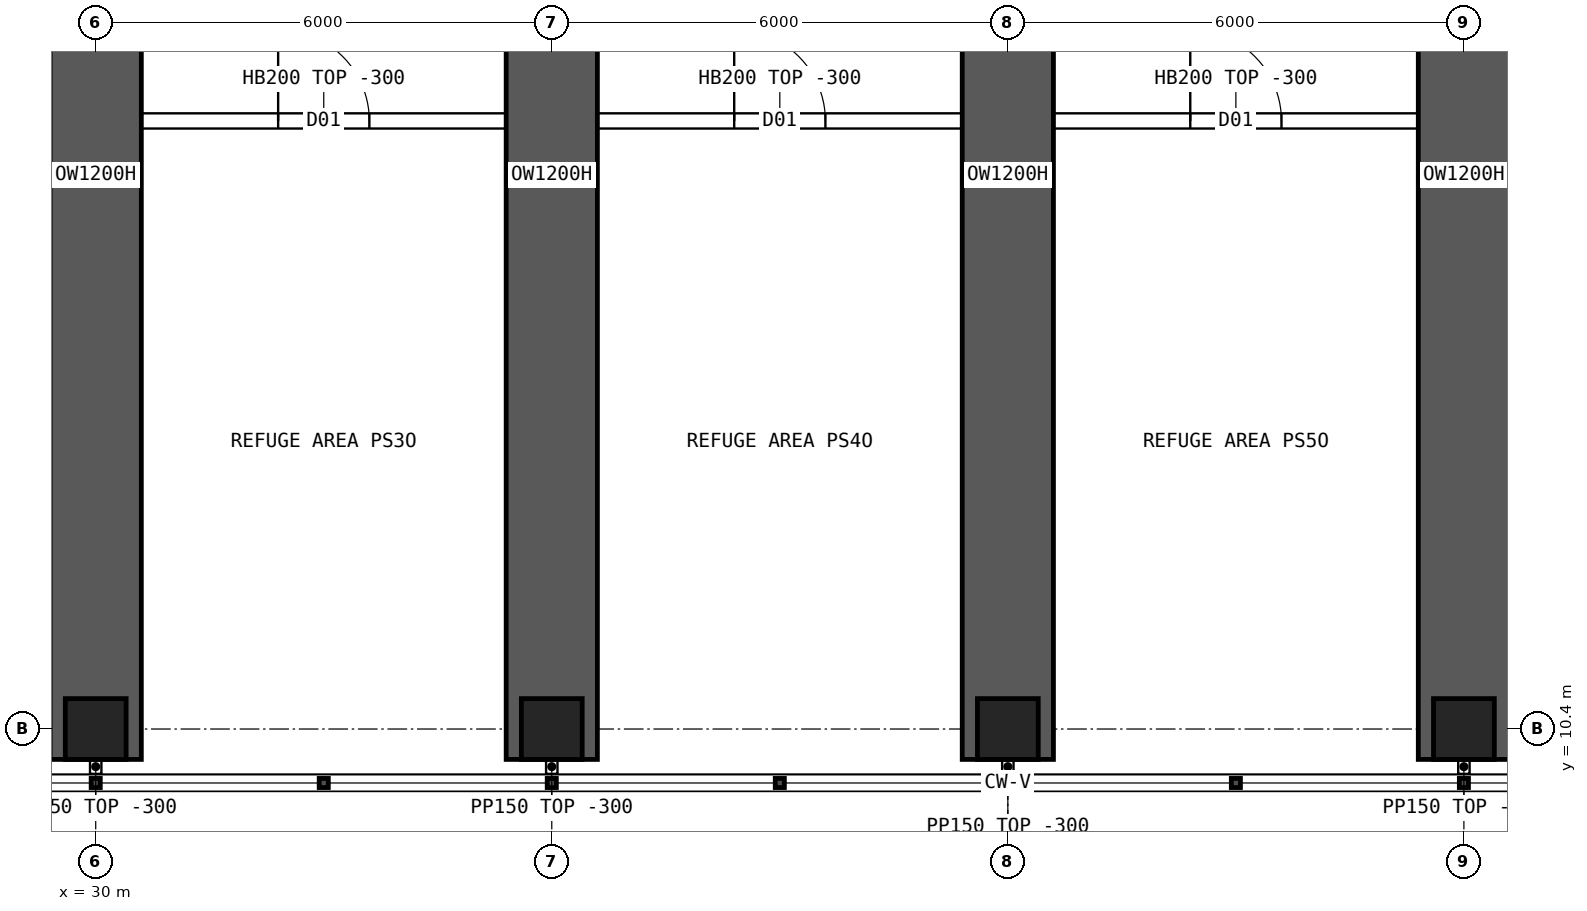
"""IFC4 building model, lengths in metres.
Left out: names, types, materials, properties, quantities, classifications, styles, units other than length and angle.
Written with IfcOpenShell. Run it as: python <this file> out.ifc"""

import sys

from ifc_helpers import new_model, si_unit, direction, frame, frame_2d, origin, origin_2d, place, context, subcontext, project, spatial, rectangle, hollow_rectangle, extrude, element, fill, save


model = new_model("IFC4")
c1 = context("Model", 3, precision=1e-05, world=origin(), true_north=direction((0.0, 1.0)))
c2 = subcontext(c1, "Body", "Model", "MODEL_VIEW")
j1 = project(units=[si_unit("LENGTHUNIT", "METRE"), si_unit("PLANEANGLEUNIT", "RADIAN")], contexts=[c1])
p1 = place(None, origin())
s1 = spatial("IfcSite", under=j1, at=p1, CompositionType="ELEMENT")
p2 = place(p1, origin())
s2 = spatial("IfcBuilding", under=s1, at=p2, CompositionType="ELEMENT")
p3 = place(p2, frame((0.0, 0.0, 201.1)))
s3 = spatial("IfcBuildingStorey", under=s2, at=p3, CompositionType="ELEMENT", Elevation=201.1)
for number, where, z_axis, x_axis in (
    (1, (30.0, 10.4, 0.0), (0.0, 0.0, 1.0), (1.0, 0.0, 0.0)),
    (2, (36.0, 10.4, 0.0), (0.0, 0.0, 1.0), (1.0, 0.0, 0.0)),
    (3, (42.0, 10.4, 0.0), (0.0, 0.0, 1.0), (1.0, 0.0, 0.0)),
    (4, (48.0, 10.4, 0.0), (0.0, 0.0, 1.0), (1.0, 0.0, 0.0)),
):
    element("IfcColumn", number, at=place(p3, frame(where, z_axis=z_axis, x_axis=x_axis)), inside=s3, PredefinedType="COLUMN", context=c2, shape_type="SweptSolid", body=[
        extrude(hollow_rectangle(XDim=0.8, YDim=0.8, WallThickness=0.08, at=origin_2d()), origin(), (0.0, 0.0, 1.0), 7.2),
    ])
p4 = place(p3, frame((30.0, 10.0, 0.0), z_axis=(0.0, 0.0, 1.0), x_axis=(0.0, 1.0, 0.0)))
e5 = element("IfcWall", 5, at=p4, inside=s3, PredefinedType="SHEAR", context=c2, shape_type="SweptSolid", body=[
    extrude(rectangle(XDim=15.375, YDim=1.2, at=frame_2d((7.688, 0.0))), origin(), (0.0, 0.0, 1.0), 7.2),
])
p5 = place(p4, frame((13.775, 0.0, 0.0)))
e6 = element("IfcOpeningElement", 6, at=p5, cuts=e5, PredefinedType="OPENING", context=c2, shape_type="SweptSolid", body=[
    extrude(rectangle(XDim=1.2, YDim=2.1, at=frame_2d((0.6, 1.05))), frame((0.0, 0.61, 0.0), z_axis=(0.0, -1.0, 0.0), x_axis=(1.0, 0.0, 0.0)), (0.0, 0.0, 1.0), 1.22),
])
p6 = place(p3, frame((36.0, 10.0, 0.0), z_axis=(0.0, 0.0, 1.0), x_axis=(0.0, 1.0, 0.0)))
e7 = element("IfcWall", 7, at=p6, inside=s3, PredefinedType="SHEAR", context=c2, shape_type="SweptSolid", body=[
    extrude(rectangle(XDim=15.375, YDim=1.2, at=frame_2d((7.688, 0.0))), origin(), (0.0, 0.0, 1.0), 7.2),
])
p7 = place(p6, frame((13.775, 0.0, 0.0)))
e8 = element("IfcOpeningElement", 8, at=p7, cuts=e7, PredefinedType="OPENING", context=c2, shape_type="SweptSolid", body=[
    extrude(rectangle(XDim=1.2, YDim=2.1, at=frame_2d((0.6, 1.05))), frame((0.0, 0.61, 0.0), z_axis=(0.0, -1.0, 0.0), x_axis=(1.0, 0.0, 0.0)), (0.0, 0.0, 1.0), 1.22),
])
p8 = place(p3, frame((42.0, 10.0, 0.0), z_axis=(0.0, 0.0, 1.0), x_axis=(0.0, 1.0, 0.0)))
e9 = element("IfcWall", 9, at=p8, inside=s3, PredefinedType="SHEAR", context=c2, shape_type="SweptSolid", body=[
    extrude(rectangle(XDim=15.375, YDim=1.2, at=frame_2d((7.688, 0.0))), origin(), (0.0, 0.0, 1.0), 7.2),
])
p9 = place(p8, frame((13.775, 0.0, 0.0)))
e10 = element("IfcOpeningElement", 10, at=p9, cuts=e9, PredefinedType="OPENING", context=c2, shape_type="SweptSolid", body=[
    extrude(rectangle(XDim=1.2, YDim=2.1, at=frame_2d((0.6, 1.05))), frame((0.0, 0.61, 0.0), z_axis=(0.0, -1.0, 0.0), x_axis=(1.0, 0.0, 0.0)), (0.0, 0.0, 1.0), 1.22),
])
p10 = place(p3, frame((48.0, 10.0, 0.0), z_axis=(0.0, 0.0, 1.0), x_axis=(0.0, 1.0, 0.0)))
e11 = element("IfcWall", 11, at=p10, inside=s3, PredefinedType="SHEAR", context=c2, shape_type="SweptSolid", body=[
    extrude(rectangle(XDim=15.375, YDim=1.2, at=frame_2d((7.688, 0.0))), origin(), (0.0, 0.0, 1.0), 7.2),
])
p11 = place(p10, frame((13.775, 0.0, 0.0)))
e12 = element("IfcOpeningElement", 12, at=p11, cuts=e11, PredefinedType="OPENING", context=c2, shape_type="SweptSolid", body=[
    extrude(rectangle(XDim=1.2, YDim=2.1, at=frame_2d((0.6, 1.05))), frame((0.0, 0.61, 0.0), z_axis=(0.0, -1.0, 0.0), x_axis=(1.0, 0.0, 0.0)), (0.0, 0.0, 1.0), 1.22),
])
p12 = place(p3, frame((24.425, 18.4, 0.0), z_axis=(0.0, 0.0, 1.0), x_axis=(1.0, 0.0, 0.0)))
e13 = element("IfcWall", 13, at=p12, inside=s3, PredefinedType="SOLIDWALL", context=c2, shape_type="SweptSolid", body=[
    extrude(rectangle(XDim=5.15, YDim=0.2, at=frame_2d((2.575, 0.0))), origin(), (0.0, 0.0, 1.0), 6.9),
])
p13 = place(p12, frame((1.975, 0.0, 0.0)))
e14 = element("IfcOpeningElement", 14, at=p13, cuts=e13, PredefinedType="OPENING", context=c2, shape_type="SweptSolid", body=[
    extrude(rectangle(XDim=1.2, YDim=2.1, at=frame_2d((0.6, 1.05))), frame((0.0, 0.11, 0.0), z_axis=(0.0, -1.0, 0.0), x_axis=(1.0, 0.0, 0.0)), (0.0, 0.0, 1.0), 0.22),
])
p14 = place(p3, frame((30.425, 18.4, 0.0), z_axis=(0.0, 0.0, 1.0), x_axis=(1.0, 0.0, 0.0)))
e15 = element("IfcWall", 15, at=p14, inside=s3, PredefinedType="SOLIDWALL", context=c2, shape_type="SweptSolid", body=[
    extrude(rectangle(XDim=5.15, YDim=0.2, at=frame_2d((2.575, 0.0))), origin(), (0.0, 0.0, 1.0), 6.9),
])
p15 = place(p14, frame((1.975, 0.0, 0.0)))
e16 = element("IfcOpeningElement", 16, at=p15, cuts=e15, PredefinedType="OPENING", context=c2, shape_type="SweptSolid", body=[
    extrude(rectangle(XDim=1.2, YDim=2.1, at=frame_2d((0.6, 1.05))), frame((0.0, 0.11, 0.0), z_axis=(0.0, -1.0, 0.0), x_axis=(1.0, 0.0, 0.0)), (0.0, 0.0, 1.0), 0.22),
])
p16 = place(p3, frame((36.425, 18.4, 0.0), z_axis=(0.0, 0.0, 1.0), x_axis=(1.0, 0.0, 0.0)))
e17 = element("IfcWall", 17, at=p16, inside=s3, PredefinedType="SOLIDWALL", context=c2, shape_type="SweptSolid", body=[
    extrude(rectangle(XDim=5.15, YDim=0.2, at=frame_2d((2.575, 0.0))), origin(), (0.0, 0.0, 1.0), 6.9),
])
p17 = place(p16, frame((1.975, 0.0, 0.0)))
e18 = element("IfcOpeningElement", 18, at=p17, cuts=e17, PredefinedType="OPENING", context=c2, shape_type="SweptSolid", body=[
    extrude(rectangle(XDim=1.2, YDim=2.1, at=frame_2d((0.6, 1.05))), frame((0.0, 0.11, 0.0), z_axis=(0.0, -1.0, 0.0), x_axis=(1.0, 0.0, 0.0)), (0.0, 0.0, 1.0), 0.22),
])
p18 = place(p3, frame((42.425, 18.4, 0.0), z_axis=(0.0, 0.0, 1.0), x_axis=(1.0, 0.0, 0.0)))
e19 = element("IfcWall", 19, at=p18, inside=s3, PredefinedType="SOLIDWALL", context=c2, shape_type="SweptSolid", body=[
    extrude(rectangle(XDim=5.15, YDim=0.2, at=frame_2d((2.575, 0.0))), origin(), (0.0, 0.0, 1.0), 6.9),
])
p19 = place(p18, frame((1.975, 0.0, 0.0)))
e20 = element("IfcOpeningElement", 20, at=p19, cuts=e19, PredefinedType="OPENING", context=c2, shape_type="SweptSolid", body=[
    extrude(rectangle(XDim=1.2, YDim=2.1, at=frame_2d((0.6, 1.05))), frame((0.0, 0.11, 0.0), z_axis=(0.0, -1.0, 0.0), x_axis=(1.0, 0.0, 0.0)), (0.0, 0.0, 1.0), 0.22),
])
p20 = place(p3, frame((48.425, 18.4, 0.0), z_axis=(0.0, 0.0, 1.0), x_axis=(1.0, 0.0, 0.0)))
e21 = element("IfcWall", 21, at=p20, inside=s3, PredefinedType="SOLIDWALL", context=c2, shape_type="SweptSolid", body=[
    extrude(rectangle(XDim=5.15, YDim=0.2, at=frame_2d((2.575, 0.0))), origin(), (0.0, 0.0, 1.0), 6.9),
])
p21 = place(p20, frame((1.975, 0.0, 0.0)))
e22 = element("IfcOpeningElement", 22, at=p21, cuts=e21, PredefinedType="OPENING", context=c2, shape_type="SweptSolid", body=[
    extrude(rectangle(XDim=1.2, YDim=2.1, at=frame_2d((0.6, 1.05))), frame((0.0, 0.11, 0.0), z_axis=(0.0, -1.0, 0.0), x_axis=(1.0, 0.0, 0.0)), (0.0, 0.0, 1.0), 0.22),
])
for number, where, z_axis, x_axis in (
    (23, (30.0, 10.0, 0.0), (0.0, 0.0, 1.0), (0.0, -1.0, 0.0)),
    (24, (36.0, 10.0, 0.0), (0.0, 0.0, 1.0), (0.0, -1.0, 0.0)),
    (25, (42.0, 10.0, 0.0), (0.0, 0.0, 1.0), (0.0, -1.0, 0.0)),
    (26, (48.0, 10.0, 0.0), (0.0, 0.0, 1.0), (0.0, -1.0, 0.0)),
):
    element("IfcWall", number, at=place(p3, frame(where, z_axis=z_axis, x_axis=x_axis)), inside=s3, PredefinedType="PARTITIONING", context=c2, shape_type="SweptSolid", body=[
        extrude(rectangle(XDim=0.19, YDim=0.15, at=frame_2d((0.095, 0.0))), origin(), (0.0, 0.0, 1.0), 6.9),
    ])
p22 = place(p15, origin())
e27 = element("IfcDoor", 27, at=p22, inside=s3, OperationType="SINGLE_SWING_LEFT", PredefinedType="DOOR", context=c2, shape_type="SweptSolid", body=[
    extrude(rectangle(XDim=1.2, YDim=2.1, at=frame_2d((0.6, 1.05))), frame((0.0, 0.025, 0.0), z_axis=(0.0, -1.0, 0.0), x_axis=(1.0, 0.0, 0.0)), (0.0, 0.0, 1.0), 0.05),
])
fill(e16, e27)
p23 = place(p17, origin())
e28 = element("IfcDoor", 28, at=p23, inside=s3, OperationType="SINGLE_SWING_LEFT", PredefinedType="DOOR", context=c2, shape_type="SweptSolid", body=[
    extrude(rectangle(XDim=1.2, YDim=2.1, at=frame_2d((0.6, 1.05))), frame((0.0, 0.025, 0.0), z_axis=(0.0, -1.0, 0.0), x_axis=(1.0, 0.0, 0.0)), (0.0, 0.0, 1.0), 0.05),
])
fill(e18, e28)
p24 = place(p19, origin())
e29 = element("IfcDoor", 29, at=p24, inside=s3, OperationType="SINGLE_SWING_LEFT", PredefinedType="DOOR", context=c2, shape_type="SweptSolid", body=[
    extrude(rectangle(XDim=1.2, YDim=2.1, at=frame_2d((0.6, 1.05))), frame((0.0, 0.025, 0.0), z_axis=(0.0, -1.0, 0.0), x_axis=(1.0, 0.0, 0.0)), (0.0, 0.0, 1.0), 0.05),
])
fill(e20, e29)
save(model, sys.argv[1])
